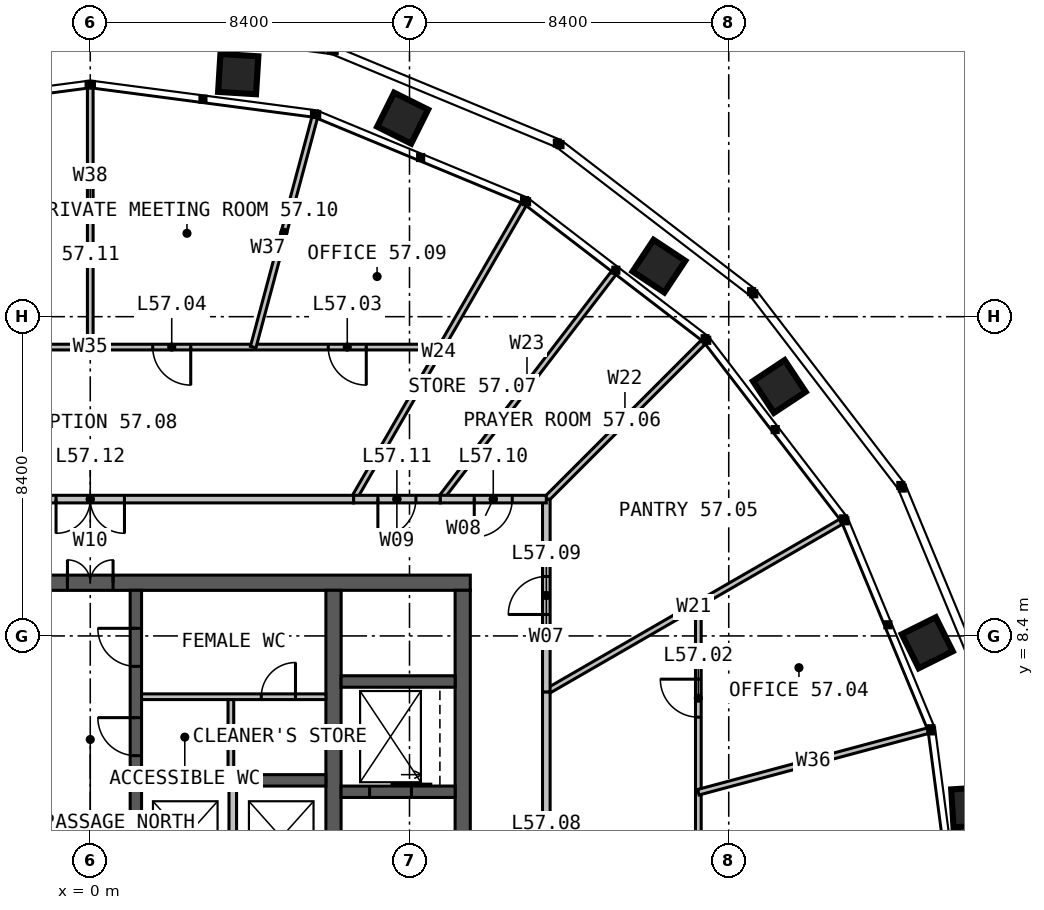
"""IFC4 building model, lengths in metres.
Left out: names, types, materials, properties, quantities, classifications, styles, units other than length and angle.
Written with IfcOpenShell. Run it as: python <this file> out.ifc"""

import sys

from ifc_helpers import new_model, si_unit, direction, frame, frame_2d, origin, place, context, subcontext, project, spatial, rectangle, extrude, element, fill, save


model = new_model("IFC4")
c1 = context("Model", 3, precision=1e-05, world=origin(), true_north=direction((0.0, 1.0)))
c2 = subcontext(c1, "Body", "Model", "MODEL_VIEW")
j1 = project(units=[si_unit("LENGTHUNIT", "METRE"), si_unit("PLANEANGLEUNIT", "RADIAN")], contexts=[c1])
p1 = place(None, origin())
s1 = spatial("IfcSite", under=j1, at=p1, CompositionType="ELEMENT")
p2 = place(p1, origin())
s2 = spatial("IfcBuilding", under=s1, at=p2, CompositionType="ELEMENT")
p3 = place(p2, frame((0.0, 0.0, 236.0)))
s3 = spatial("IfcBuildingStorey", under=s2, at=p3, CompositionType="ELEMENT", Elevation=236.0)
p4 = place(p3, frame((-10.0, 9.8, 0.0), z_axis=(0.0, 0.0, 1.0), x_axis=(1.0, 0.0, 0.0)))
e1 = element("IfcWall", 1, at=p4, inside=s3, PredefinedType="SOLIDWALL", context=c2, shape_type="SweptSolid", body=[
    extrude(rectangle(XDim=20.0, YDim=0.4, at=frame_2d((10.0, 0.0))), origin(), (0.0, 0.0, 1.0), 4.0),
])
p5 = place(p4, frame((9.4, 0.0, 0.0)))
e2 = element("IfcOpeningElement", 2, at=p5, cuts=e1, PredefinedType="OPENING", context=c2, shape_type="SweptSolid", body=[
    extrude(rectangle(XDim=1.2, YDim=2.2, at=frame_2d((0.6, 1.1))), frame((0.0, 0.21, 0.0), z_axis=(0.0, -1.0, 0.0), x_axis=(1.0, 0.0, 0.0)), (0.0, 0.0, 1.0), 0.42),
])
p6 = place(p3, frame((9.8, -9.6, 0.0), z_axis=(0.0, 0.0, 1.0), x_axis=(0.0, 1.0, 0.0)))
e3 = element("IfcWall", 3, at=p6, inside=s3, PredefinedType="SOLIDWALL", context=c2, shape_type="SweptSolid", body=[
    extrude(rectangle(XDim=19.2, YDim=0.4, at=frame_2d((9.6, 0.0))), origin(), (0.0, 0.0, 1.0), 4.0),
])
p7 = place(p3, frame((6.4, 9.6, 0.0), z_axis=(0.0, 0.0, 1.0), x_axis=(0.0, -1.0, 0.0)))
e4 = element("IfcWall", 4, at=p7, inside=s3, PredefinedType="SOLIDWALL", context=c2, shape_type="SweptSolid", body=[
    extrude(rectangle(XDim=19.2, YDim=0.4, at=frame_2d((9.6, 0.0))), origin(), (0.0, 0.0, 1.0), 4.0),
])
p8 = place(p7, frame((9.1, 0.0, 0.0)))
e5 = element("IfcOpeningElement", 5, at=p8, cuts=e4, PredefinedType="OPENING", context=c2, shape_type="SweptSolid", body=[
    extrude(rectangle(XDim=1.0, YDim=2.2, at=frame_2d((0.5, 1.1))), frame((0.0, 0.21, 0.0), z_axis=(0.0, -1.0, 0.0), x_axis=(1.0, 0.0, 0.0)), (0.0, 0.0, 1.0), 0.42),
])
p9 = place(p3, frame((1.35, 4.6, 0.0), z_axis=(0.0, 0.0, 1.0), x_axis=(1.0, 0.0, 0.0)))
e6 = element("IfcWall", 6, at=p9, inside=s3, PredefinedType="SOLIDWALL", context=c2, shape_type="SweptSolid", body=[
    extrude(rectangle(XDim=4.85, YDim=0.3, at=frame_2d((2.425, 0.0))), origin(), (0.0, 0.0, 1.0), 4.0),
])
p10 = place(p3, frame((1.2, 1.45, 0.0), z_axis=(0.0, 0.0, 1.0), x_axis=(0.0, 1.0, 0.0)))
e7 = element("IfcWall", 7, at=p10, inside=s3, PredefinedType="SOLIDWALL", context=c2, shape_type="SweptSolid", body=[
    extrude(rectangle(XDim=8.15, YDim=0.3, at=frame_2d((4.075, 0.0))), origin(), (0.0, 0.0, 1.0), 4.0),
])
p11 = place(p10, frame((3.8, 0.0, 0.0)))
e8 = element("IfcOpeningElement", 8, at=p11, cuts=e7, PredefinedType="OPENING", context=c2, shape_type="SweptSolid", body=[
    extrude(rectangle(XDim=1.0, YDim=2.2, at=frame_2d((0.5, 1.1))), frame((0.0, 0.16, 0.0), z_axis=(0.0, -1.0, 0.0), x_axis=(1.0, 0.0, 0.0)), (0.0, 0.0, 1.0), 0.32),
])
p12 = place(p10, frame((6.15, 0.0, 0.0)))
e9 = element("IfcOpeningElement", 9, at=p12, cuts=e7, PredefinedType="OPENING", context=c2, shape_type="SweptSolid", body=[
    extrude(rectangle(XDim=1.0, YDim=2.2, at=frame_2d((0.5, 1.1))), frame((0.0, 0.16, 0.0), z_axis=(0.0, -1.0, 0.0), x_axis=(1.0, 0.0, 0.0)), (0.0, 0.0, 1.0), 0.32),
])
p13 = place(p3, frame((6.6, 4.3, 0.0), z_axis=(0.0, 0.0, 1.0), x_axis=(1.0, 0.0, 0.0)))
e10 = element("IfcWall", 10, at=p13, inside=s3, PredefinedType="SOLIDWALL", context=c2, shape_type="SweptSolid", body=[
    extrude(rectangle(XDim=3.0, YDim=0.3, at=frame_2d((1.5, 0.0))), origin(), (0.0, 0.0, 1.0), 4.0),
])
p14 = place(p13, frame((0.75, 0.0, 0.0)))
e11 = element("IfcOpeningElement", 11, at=p14, cuts=e10, PredefinedType="OPENING", context=c2, shape_type="SweptSolid", body=[
    extrude(rectangle(XDim=1.1, YDim=2.2, at=frame_2d((0.55, 1.1))), frame((0.0, 0.16, 0.0), z_axis=(0.0, -1.0, 0.0), x_axis=(1.0, 0.0, 0.0)), (0.0, 0.0, 1.0), 0.32),
])
p15 = place(p3, frame((6.6, 7.2, 0.0), z_axis=(0.0, 0.0, 1.0), x_axis=(1.0, 0.0, 0.0)))
e12 = element("IfcWall", 12, at=p15, inside=s3, PredefinedType="SOLIDWALL", context=c2, shape_type="SweptSolid", body=[
    extrude(rectangle(XDim=3.0, YDim=0.3, at=frame_2d((1.5, 0.0))), origin(), (0.0, 0.0, 1.0), 4.0),
])
p16 = place(p3, frame((3.75, 1.75, 0.0), z_axis=(0.0, 0.0, 1.0), x_axis=(0.0, 1.0, 0.0)))
e13 = element("IfcWall", 13, at=p16, inside=s3, PredefinedType="SOLIDWALL", context=c2, shape_type="SweptSolid", body=[
    extrude(rectangle(XDim=2.7, YDim=0.2, at=frame_2d((1.35, 0.0))), origin(), (0.0, 0.0, 1.0), 3.75),
])
p17 = place(p3, frame((1.35, 6.8, 0.0), z_axis=(0.0, 0.0, 1.0), x_axis=(1.0, 0.0, 0.0)))
e14 = element("IfcWall", 14, at=p17, inside=s3, PredefinedType="PARTITIONING", context=c2, shape_type="SweptSolid", body=[
    extrude(rectangle(XDim=4.85, YDim=0.15, at=frame_2d((2.425, 0.0))), origin(), (0.0, 0.0, 1.0), 3.75),
])
p18 = place(p17, frame((3.15, 0.0, 0.0)))
e15 = element("IfcOpeningElement", 15, at=p18, cuts=e14, PredefinedType="OPENING", context=c2, shape_type="SweptSolid", body=[
    extrude(rectangle(XDim=0.9, YDim=2.2, at=frame_2d((0.45, 1.1))), frame((0.0, 0.085, 0.0), z_axis=(0.0, -1.0, 0.0), x_axis=(1.0, 0.0, 0.0)), (0.0, 0.0, 1.0), 0.17),
])
p19 = place(p3, frame((3.7, 4.75, 0.0), z_axis=(0.0, 0.0, 1.0), x_axis=(0.0, 1.0, 0.0)))
e16 = element("IfcWall", 16, at=p19, inside=s3, PredefinedType="PARTITIONING", context=c2, shape_type="SweptSolid", body=[
    extrude(rectangle(XDim=1.975, YDim=0.15, at=frame_2d((0.988, 0.0))), origin(), (0.0, 0.0, 1.0), 3.75),
])
p20 = place(p3, frame((12.0, 6.928, 0.0), z_axis=(0.0, 0.0, 1.0), x_axis=(0.866025969295, 0.499999020506, 0.0)))
e17 = element("IfcWall", 17, at=p20, inside=s3, PredefinedType="PARTITIONING", context=c2, shape_type="SweptSolid", body=[
    extrude(rectangle(XDim=8.966, YDim=0.15, at=frame_2d((4.483, 0.0))), origin(), (0.0, 0.0, 1.0), 2.79),
])
p21 = place(p3, frame((12.0, 12.0, 0.0), z_axis=(0.0, 0.0, 1.0), x_axis=(0.707106781187, 0.707106781187, 0.0)))
e18 = element("IfcWall", 18, at=p21, inside=s3, PredefinedType="PARTITIONING", context=c2, shape_type="SweptSolid", body=[
    extrude(rectangle(XDim=5.852, YDim=0.15, at=frame_2d((2.926, 0.0))), origin(), (0.0, 0.0, 1.0), 2.79),
])
p22 = place(p3, frame((9.208, 12.0, 0.0), z_axis=(0.0, 0.0, 1.0), x_axis=(0.608753999833, 0.793359040843, 0.0)))
e19 = element("IfcWall", 19, at=p22, inside=s3, PredefinedType="PARTITIONING", context=c2, shape_type="SweptSolid", body=[
    extrude(rectangle(XDim=7.501, YDim=0.15, at=frame_2d((3.75, 0.0))), origin(), (0.0, 0.0, 1.0), 2.79),
])
p23 = place(p3, frame((6.928, 12.0, 0.0), z_axis=(0.0, 0.0, 1.0), x_axis=(0.499999020506, 0.866025969295, 0.0)))
e20 = element("IfcWall", 20, at=p23, inside=s3, PredefinedType="PARTITIONING", context=c2, shape_type="SweptSolid", body=[
    extrude(rectangle(XDim=8.966, YDim=0.15, at=frame_2d((4.483, 0.0))), origin(), (0.0, 0.0, 1.0), 2.79),
])
p24 = place(p3, frame((16.0, -4.287, 0.0), z_axis=(0.0, 0.0, 1.0), x_axis=(0.0, 1.0, 0.0)))
e21 = element("IfcWall", 21, at=p24, inside=s3, PredefinedType="PARTITIONING", context=c2, shape_type="SweptSolid", body=[
    extrude(rectangle(XDim=13.525, YDim=0.15, at=frame_2d((6.762, 0.0))), origin(), (0.0, 0.0, 1.0), 2.79),
])
p25 = place(p24, frame((3.387, 0.0, 0.0)))
e22 = element("IfcOpeningElement", 22, at=p25, cuts=e21, PredefinedType="OPENING", context=c2, shape_type="SweptSolid", body=[
    extrude(rectangle(XDim=1.8, YDim=2.2, at=frame_2d((0.9, 1.1))), frame((0.0, 0.085, 0.0), z_axis=(0.0, -1.0, 0.0), x_axis=(1.0, 0.0, 0.0)), (0.0, 0.0, 1.0), 0.17),
])
p26 = place(p24, frame((10.55, 0.0, 0.0)))
e23 = element("IfcOpeningElement", 23, at=p26, cuts=e21, PredefinedType="OPENING", context=c2, shape_type="SweptSolid", body=[
    extrude(rectangle(XDim=1.0, YDim=2.2, at=frame_2d((0.5, 1.1))), frame((0.0, 0.085, 0.0), z_axis=(0.0, -1.0, 0.0), x_axis=(1.0, 0.0, 0.0)), (0.0, 0.0, 1.0), 0.17),
])
p27 = place(p3, frame((16.0, 4.287, 0.0), z_axis=(0.0, 0.0, 1.0), x_axis=(0.965927328821, 0.258813437513, 0.0)))
e24 = element("IfcWall", 24, at=p27, inside=s3, PredefinedType="PARTITIONING", context=c2, shape_type="SweptSolid", body=[
    extrude(rectangle(XDim=6.258, YDim=0.15, at=frame_2d((3.129, 0.0))), origin(), (0.0, 0.0, 1.0), 2.79),
])
p28 = place(p3, frame((12.0, -3.215, 0.0), z_axis=(0.0, 0.0, 1.0), x_axis=(0.0, 1.0, 0.0)))
e25 = element("IfcWall", 25, at=p28, inside=s3, PredefinedType="PARTITIONING", context=c2, shape_type="SweptSolid", body=[
    extrude(rectangle(XDim=10.144, YDim=0.2, at=frame_2d((5.072, 0.0))), origin(), (0.0, 0.0, 1.0), 3.8),
])
p29 = place(p28, frame((4.172, 0.0, 0.0)))
e26 = element("IfcOpeningElement", 26, at=p29, cuts=e25, PredefinedType="OPENING", context=c2, shape_type="SweptSolid", body=[
    extrude(rectangle(XDim=1.8, YDim=2.2, at=frame_2d((0.9, 1.1))), frame((0.0, 0.11, 0.0), z_axis=(0.0, -1.0, 0.0), x_axis=(1.0, 0.0, 0.0)), (0.0, 0.0, 1.0), 0.22),
])
p30 = place(p3, frame((12.0, 6.928, 0.0), z_axis=(0.0, 0.0, 1.0), x_axis=(0.0, 1.0, 0.0)))
e27 = element("IfcWall", 27, at=p30, inside=s3, PredefinedType="PARTITIONING", context=c2, shape_type="SweptSolid", body=[
    extrude(rectangle(XDim=5.072, YDim=0.2, at=frame_2d((2.536, 0.0))), origin(), (0.0, 0.0, 1.0), 3.8),
])
p31 = place(p30, frame((2.036, 0.0, 0.0)))
e28 = element("IfcOpeningElement", 28, at=p31, cuts=e27, PredefinedType="OPENING", context=c2, shape_type="SweptSolid", body=[
    extrude(rectangle(XDim=1.0, YDim=2.2, at=frame_2d((0.5, 1.1))), frame((0.0, 0.11, 0.0), z_axis=(0.0, -1.0, 0.0), x_axis=(1.0, 0.0, 0.0)), (0.0, 0.0, 1.0), 0.22),
])
p32 = place(p3, frame((12.0, 12.0, 0.0), z_axis=(0.0, 0.0, 1.0), x_axis=(-1.0, 0.0, 0.0)))
e29 = element("IfcWall", 29, at=p32, inside=s3, PredefinedType="PARTITIONING", context=c2, shape_type="SweptSolid", body=[
    extrude(rectangle(XDim=2.792, YDim=0.2, at=frame_2d((1.396, 0.0))), origin(), (0.0, 0.0, 1.0), 3.8),
])
p33 = place(p32, frame((0.896, 0.0, 0.0)))
e30 = element("IfcOpeningElement", 30, at=p33, cuts=e29, PredefinedType="OPENING", context=c2, shape_type="SweptSolid", body=[
    extrude(rectangle(XDim=1.0, YDim=2.2, at=frame_2d((0.5, 1.1))), frame((0.0, 0.11, 0.0), z_axis=(0.0, -1.0, 0.0), x_axis=(1.0, 0.0, 0.0)), (0.0, 0.0, 1.0), 0.22),
])
p34 = place(p3, frame((9.208, 12.0, 0.0), z_axis=(0.0, 0.0, 1.0), x_axis=(-1.0, 0.0, 0.0)))
e31 = element("IfcWall", 31, at=p34, inside=s3, PredefinedType="PARTITIONING", context=c2, shape_type="SweptSolid", body=[
    extrude(rectangle(XDim=2.28, YDim=0.2, at=frame_2d((1.14, 0.0))), origin(), (0.0, 0.0, 1.0), 3.8),
])
p35 = place(p34, frame((0.64, 0.0, 0.0)))
e32 = element("IfcOpeningElement", 32, at=p35, cuts=e31, PredefinedType="OPENING", context=c2, shape_type="SweptSolid", body=[
    extrude(rectangle(XDim=1.0, YDim=2.2, at=frame_2d((0.5, 1.1))), frame((0.0, 0.11, 0.0), z_axis=(0.0, -1.0, 0.0), x_axis=(1.0, 0.0, 0.0)), (0.0, 0.0, 1.0), 0.22),
])
p36 = place(p3, frame((9.238, 16.0, 0.0), z_axis=(0.0, 0.0, 1.0), x_axis=(-1.0, 0.0, 0.0)))
e33 = element("IfcWall", 33, at=p36, inside=s3, PredefinedType="PARTITIONING", context=c2, shape_type="SweptSolid", body=[
    extrude(rectangle(XDim=18.475, YDim=0.15, at=frame_2d((9.238, 0.0))), origin(), (0.0, 0.0, 1.0), 2.79),
])
p37 = place(p36, frame((1.975, 0.0, 0.0)))
e34 = element("IfcOpeningElement", 34, at=p37, cuts=e33, PredefinedType="OPENING", context=c2, shape_type="SweptSolid", body=[
    extrude(rectangle(XDim=1.0, YDim=2.2, at=frame_2d((0.5, 1.1))), frame((0.0, 0.085, 0.0), z_axis=(0.0, -1.0, 0.0), x_axis=(1.0, 0.0, 0.0)), (0.0, 0.0, 1.0), 0.17),
])
p38 = place(p36, frame((6.594, 0.0, 0.0)))
e35 = element("IfcOpeningElement", 35, at=p38, cuts=e33, PredefinedType="OPENING", context=c2, shape_type="SweptSolid", body=[
    extrude(rectangle(XDim=1.0, YDim=2.2, at=frame_2d((0.5, 1.1))), frame((0.0, 0.085, 0.0), z_axis=(0.0, -1.0, 0.0), x_axis=(1.0, 0.0, 0.0)), (0.0, 0.0, 1.0), 0.17),
])
p39 = place(p36, frame((12.051, 0.0, 0.0)))
e36 = element("IfcOpeningElement", 36, at=p39, cuts=e33, PredefinedType="OPENING", context=c2, shape_type="SweptSolid", body=[
    extrude(rectangle(XDim=1.0, YDim=2.2, at=frame_2d((0.5, 1.1))), frame((0.0, 0.085, 0.0), z_axis=(0.0, -1.0, 0.0), x_axis=(1.0, 0.0, 0.0)), (0.0, 0.0, 1.0), 0.17),
])
p40 = place(p36, frame((16.67, 0.0, 0.0)))
e37 = element("IfcOpeningElement", 37, at=p40, cuts=e33, PredefinedType="OPENING", context=c2, shape_type="SweptSolid", body=[
    extrude(rectangle(XDim=1.0, YDim=2.2, at=frame_2d((0.5, 1.1))), frame((0.0, 0.085, 0.0), z_axis=(0.0, -1.0, 0.0), x_axis=(1.0, 0.0, 0.0)), (0.0, 0.0, 1.0), 0.17),
])
p41 = place(p3, frame((4.287, 16.0, 0.0), z_axis=(0.0, 0.0, 1.0), x_axis=(0.258813437513, 0.965927328821, 0.0)))
e38 = element("IfcWall", 38, at=p41, inside=s3, PredefinedType="PARTITIONING", context=c2, shape_type="SweptSolid", body=[
    extrude(rectangle(XDim=6.258, YDim=0.15, at=frame_2d((3.129, 0.0))), origin(), (0.0, 0.0, 1.0), 2.79),
])
p42 = place(p3, frame((0.0, 16.0, 0.0), z_axis=(0.0, 0.0, 1.0), x_axis=(0.0, 1.0, 0.0)))
e39 = element("IfcWall", 39, at=p42, inside=s3, PredefinedType="PARTITIONING", context=c2, shape_type="SweptSolid", body=[
    extrude(rectangle(XDim=6.822, YDim=0.15, at=frame_2d((3.411, 0.0))), origin(), (0.0, 0.0, 1.0), 2.79),
])
p43 = place(p3, frame((6.928, 12.0, 0.0), z_axis=(0.0, 0.0, 1.0), x_axis=(-1.0, 0.0, 0.0)))
e40 = element("IfcWall", 40, at=p43, inside=s3, PredefinedType="PARTITIONING", context=c2, shape_type="SweptSolid", body=[
    extrude(rectangle(XDim=13.856, YDim=0.2, at=frame_2d((6.928, 0.0))), origin(), (0.0, 0.0, 1.0), 3.8),
])
p44 = place(p43, frame((6.028, 0.0, 0.0)))
e41 = element("IfcOpeningElement", 41, at=p44, cuts=e40, PredefinedType="OPENING", context=c2, shape_type="SweptSolid", body=[
    extrude(rectangle(XDim=1.8, YDim=2.2, at=frame_2d((0.9, 1.1))), frame((0.0, 0.11, 0.0), z_axis=(0.0, -1.0, 0.0), x_axis=(1.0, 0.0, 0.0)), (0.0, 0.0, 1.0), 0.22),
])
p45 = place(p5, origin())
e42 = element("IfcDoor", 42, at=p45, inside=s3, OperationType="DOUBLE_DOOR_SINGLE_SWING", PredefinedType="DOOR", context=c2, shape_type="SweptSolid", body=[
    extrude(rectangle(XDim=1.2, YDim=2.2, at=frame_2d((0.6, 1.1))), frame((0.0, 0.025, 0.0), z_axis=(0.0, -1.0, 0.0), x_axis=(1.0, 0.0, 0.0)), (0.0, 0.0, 1.0), 0.05),
])
fill(e2, e42)
p46 = place(p11, origin())
e43 = element("IfcDoor", 43, at=p46, inside=s3, OperationType="SINGLE_SWING_RIGHT", PredefinedType="DOOR", context=c2, shape_type="SweptSolid", body=[
    extrude(rectangle(XDim=1.0, YDim=2.2, at=frame_2d((0.5, 1.1))), frame((0.0, 0.025, 0.0), z_axis=(0.0, -1.0, 0.0), x_axis=(1.0, 0.0, 0.0)), (0.0, 0.0, 1.0), 0.05),
])
fill(e8, e43)
p47 = place(p12, origin())
e44 = element("IfcDoor", 44, at=p47, inside=s3, OperationType="SINGLE_SWING_RIGHT", PredefinedType="DOOR", context=c2, shape_type="SweptSolid", body=[
    extrude(rectangle(XDim=1.0, YDim=2.2, at=frame_2d((0.5, 1.1))), frame((0.0, 0.025, 0.0), z_axis=(0.0, -1.0, 0.0), x_axis=(1.0, 0.0, 0.0)), (0.0, 0.0, 1.0), 0.05),
])
fill(e9, e44)
p48 = place(p18, origin())
e45 = element("IfcDoor", 45, at=p48, inside=s3, OperationType="SINGLE_SWING_RIGHT", PredefinedType="DOOR", context=c2, shape_type="SweptSolid", body=[
    extrude(rectangle(XDim=0.9, YDim=2.2, at=frame_2d((0.45, 1.1))), frame((0.0, 0.025, 0.0), z_axis=(0.0, -1.0, 0.0), x_axis=(1.0, 0.0, 0.0)), (0.0, 0.0, 1.0), 0.05),
])
fill(e15, e45)
p49 = place(p14, origin())
e46 = element("IfcDoor", 46, at=p49, inside=s3, OperationType="SLIDING_TO_LEFT", PredefinedType="DOOR", context=c2, shape_type="SweptSolid", body=[
    extrude(rectangle(XDim=1.1, YDim=2.2, at=frame_2d((0.55, 1.1))), frame((0.0, 0.025, 0.0), z_axis=(0.0, -1.0, 0.0), x_axis=(1.0, 0.0, 0.0)), (0.0, 0.0, 1.0), 0.05),
])
fill(e11, e46)
p50 = place(p26, origin())
e47 = element("IfcDoor", 47, at=p50, inside=s3, OperationType="SINGLE_SWING_RIGHT", PredefinedType="DOOR", context=c2, shape_type="SweptSolid", body=[
    extrude(rectangle(XDim=1.0, YDim=2.2, at=frame_2d((0.5, 1.1))), frame((0.0, 0.025, 0.0), z_axis=(0.0, -1.0, 0.0), x_axis=(1.0, 0.0, 0.0)), (0.0, 0.0, 1.0), 0.05),
])
fill(e23, e47)
p51 = place(p31, origin())
e48 = element("IfcDoor", 48, at=p51, inside=s3, OperationType="SINGLE_SWING_LEFT", PredefinedType="DOOR", context=c2, shape_type="SweptSolid", body=[
    extrude(rectangle(XDim=1.0, YDim=2.2, at=frame_2d((0.5, 1.1))), frame((0.0, 0.025, 0.0), z_axis=(0.0, -1.0, 0.0), x_axis=(1.0, 0.0, 0.0)), (0.0, 0.0, 1.0), 0.05),
])
fill(e28, e48)
p52 = place(p33, origin())
e49 = element("IfcDoor", 49, at=p52, inside=s3, OperationType="SINGLE_SWING_RIGHT", PredefinedType="DOOR", context=c2, shape_type="SweptSolid", body=[
    extrude(rectangle(XDim=1.0, YDim=2.2, at=frame_2d((0.5, 1.1))), frame((0.0, 0.025, 0.0), z_axis=(0.0, -1.0, 0.0), x_axis=(1.0, 0.0, 0.0)), (0.0, 0.0, 1.0), 0.05),
])
fill(e30, e49)
p53 = place(p35, origin())
e50 = element("IfcDoor", 50, at=p53, inside=s3, OperationType="SINGLE_SWING_RIGHT", PredefinedType="DOOR", context=c2, shape_type="SweptSolid", body=[
    extrude(rectangle(XDim=1.0, YDim=2.2, at=frame_2d((0.5, 1.1))), frame((0.0, 0.025, 0.0), z_axis=(0.0, -1.0, 0.0), x_axis=(1.0, 0.0, 0.0)), (0.0, 0.0, 1.0), 0.05),
])
fill(e32, e50)
p54 = place(p37, origin())
e51 = element("IfcDoor", 51, at=p54, inside=s3, OperationType="SINGLE_SWING_LEFT", PredefinedType="DOOR", context=c2, shape_type="SweptSolid", body=[
    extrude(rectangle(XDim=1.0, YDim=2.2, at=frame_2d((0.5, 1.1))), frame((0.0, 0.025, 0.0), z_axis=(0.0, -1.0, 0.0), x_axis=(1.0, 0.0, 0.0)), (0.0, 0.0, 1.0), 0.05),
])
fill(e34, e51)
p55 = place(p38, origin())
e52 = element("IfcDoor", 52, at=p55, inside=s3, OperationType="SINGLE_SWING_LEFT", PredefinedType="DOOR", context=c2, shape_type="SweptSolid", body=[
    extrude(rectangle(XDim=1.0, YDim=2.2, at=frame_2d((0.5, 1.1))), frame((0.0, 0.025, 0.0), z_axis=(0.0, -1.0, 0.0), x_axis=(1.0, 0.0, 0.0)), (0.0, 0.0, 1.0), 0.05),
])
fill(e35, e52)
p56 = place(p44, origin())
e53 = element("IfcDoor", 53, at=p56, inside=s3, OperationType="DOUBLE_DOOR_SINGLE_SWING", PredefinedType="DOOR", context=c2, shape_type="SweptSolid", body=[
    extrude(rectangle(XDim=1.8, YDim=2.2, at=frame_2d((0.9, 1.1))), frame((0.0, 0.025, 0.0), z_axis=(0.0, -1.0, 0.0), x_axis=(1.0, 0.0, 0.0)), (0.0, 0.0, 1.0), 0.05),
])
fill(e41, e53)
save(model, sys.argv[1])
